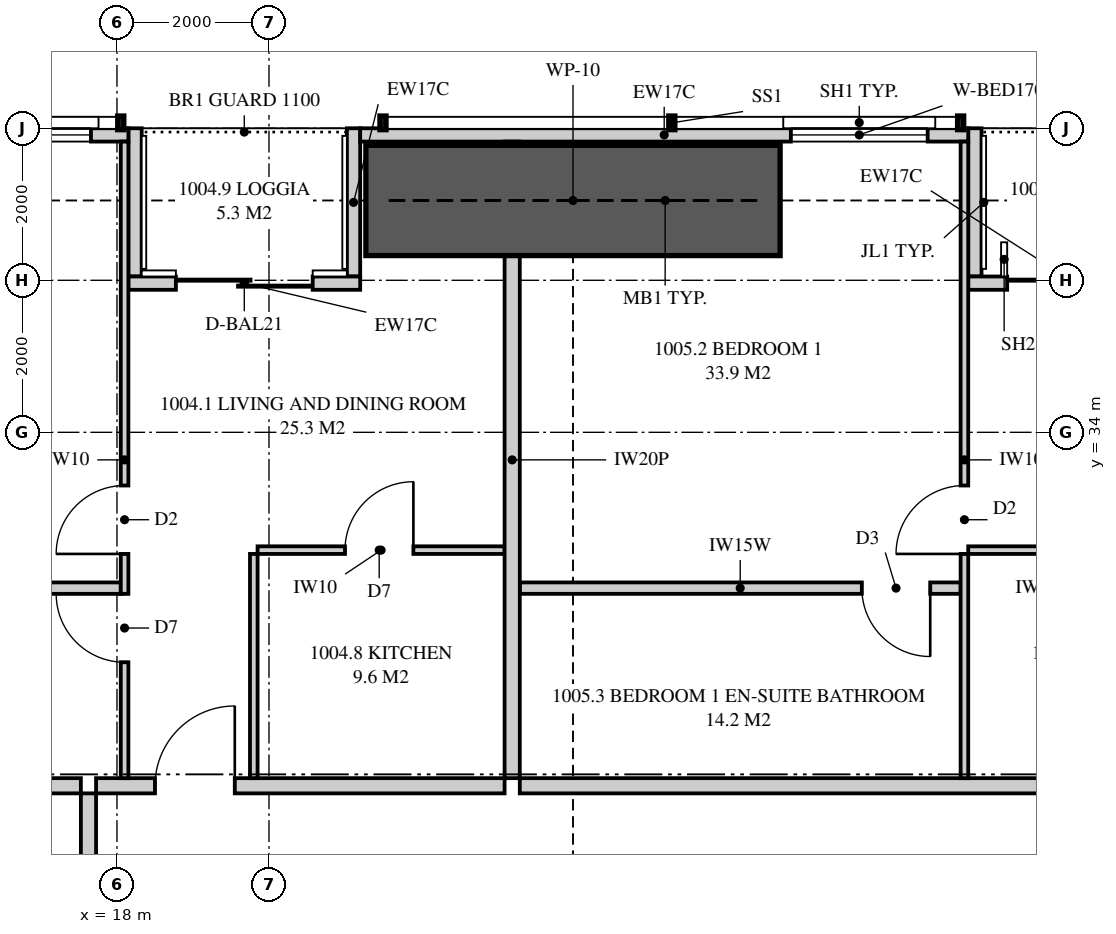
"""IFC4 building model, lengths in metres.
Left out: names, types, materials, properties, quantities, classifications, styles, units other than length and angle.
Written with IfcOpenShell. Run it as: python <this file> out.ifc"""

import sys

from ifc_helpers import new_model, si_unit, direction, frame, frame_2d, origin, place, context, subcontext, project, spatial, polyline, rectangle, outline, extrude, element, fill, save


model = new_model("IFC4")
c1 = context("Model", 3, precision=1e-05, world=origin(), true_north=direction((0.0, 1.0)))
c2 = subcontext(c1, "Body", "Model", "MODEL_VIEW")
j1 = project(units=[si_unit("LENGTHUNIT", "METRE"), si_unit("PLANEANGLEUNIT", "RADIAN")], contexts=[c1])
p1 = place(None, origin())
s1 = spatial("IfcSite", under=j1, at=p1, CompositionType="ELEMENT")
p2 = place(p1, origin())
s2 = spatial("IfcBuilding", under=s1, at=p2, CompositionType="ELEMENT")
p3 = place(p2, frame((0.0, 0.0, 41.1)))
s3 = spatial("IfcBuildingStorey", under=s2, at=p3, CompositionType="ELEMENT", Elevation=41.1)
p4 = place(p3, frame((29.2, 37.913, 0.0), z_axis=(0.0, 0.0, 1.0), x_axis=(-1.0, 0.0, 0.0)))
e1 = element("IfcWall", 1, at=p4, inside=s3, PredefinedType="SOLIDWALL", context=c2, shape_type="SweptSolid", body=[
    extrude(rectangle(XDim=8.0, YDim=0.175, at=frame_2d((4.0, 0.0))), origin(), (0.0, 0.0, 1.0), 2.15),
])
p5 = place(p4, frame((0.534, 0.0, 0.4)))
e2 = element("IfcOpeningElement", 2, at=p5, cuts=e1, PredefinedType="OPENING", context=c2, shape_type="SweptSolid", body=[
    extrude(rectangle(XDim=1.8, YDim=1.7, at=frame_2d((0.9, 0.85))), frame((0.0, 0.097, 0.0), z_axis=(0.0, -1.0, 0.0), x_axis=(1.0, 0.0, 0.0)), (0.0, 0.0, 1.0), 0.195),
])
p6 = place(p3, frame((18.15, 37.913, 0.0), z_axis=(0.0, 0.0, 1.0), x_axis=(-1.0, 0.0, 0.0)))
e3 = element("IfcWall", 3, at=p6, inside=s3, PredefinedType="SOLIDWALL", context=c2, shape_type="SweptSolid", body=[
    extrude(outline(polyline([(0.0, 0.0), (13.099, 0.0), (13.099, 3.11), (5.354, 3.11), (5.354, 2.15), (5.306, 2.15), (5.306, 3.11), (5.15, 3.11), (5.15, 2.15), (0.0, 2.15), (0.0, 0.0)])), frame((0.0, 0.087, 0.0), z_axis=(0.0, -1.0, 0.0), x_axis=(1.0, 0.0, 0.0)), (0.0, 0.0, 1.0), 0.175),
])
p7 = place(p6, frame((0.492, 0.0, 0.4)))
e4 = element("IfcOpeningElement", 4, at=p7, cuts=e3, PredefinedType="OPENING", context=c2, shape_type="SweptSolid", body=[
    extrude(rectangle(XDim=1.8, YDim=1.7, at=frame_2d((0.9, 0.85))), frame((0.0, 0.097, 0.0), z_axis=(0.0, -1.0, 0.0), x_axis=(1.0, 0.0, 0.0)), (0.0, 0.0, 1.0), 0.195),
])
p8 = place(p6, frame((7.98, 0.0, 0.4)))
e5 = element("IfcOpeningElement", 5, at=p8, cuts=e3, PredefinedType="OPENING", context=c2, shape_type="SweptSolid", body=[
    extrude(rectangle(XDim=1.8, YDim=1.7, at=frame_2d((0.9, 0.85))), frame((0.0, 0.097, 0.0), z_axis=(0.0, -1.0, 0.0), x_axis=(1.0, 0.0, 0.0)), (0.0, 0.0, 1.0), 0.195),
])
p9 = place(p3, frame((32.025, 35.962, 0.0), z_axis=(0.0, 0.0, 1.0), x_axis=(-1.0, 0.0, 0.0)))
e6 = element("IfcWall", 6, at=p9, inside=s3, PredefinedType="SOLIDWALL", context=c2, shape_type="SweptSolid", body=[
    extrude(rectangle(XDim=2.825, YDim=0.175, at=frame_2d((1.413, 0.0))), origin(), (0.0, 0.0, 1.0), 3.11),
])
p10 = place(p9, frame((0.512, 0.0, 0.0)))
e7 = element("IfcOpeningElement", 7, at=p10, cuts=e6, PredefinedType="OPENING", context=c2, shape_type="SweptSolid", body=[
    extrude(rectangle(XDim=1.8, YDim=2.1, at=frame_2d((0.9, 1.05))), frame((0.0, 0.097, 0.0), z_axis=(0.0, -1.0, 0.0), x_axis=(1.0, 0.0, 0.0)), (0.0, 0.0, 1.0), 0.195),
])
p11 = place(p3, frame((29.288, 38.0, 0.0), z_axis=(0.0, 0.0, 1.0), x_axis=(0.0, -1.0, 0.0)))
e8 = element("IfcWall", 8, at=p11, inside=s3, PredefinedType="SOLIDWALL", context=c2, shape_type="SweptSolid", body=[
    extrude(outline(polyline([(0.0, 0.0), (1.95, 0.0), (1.95, 3.11), (1.75, 3.11), (1.75, 2.15), (0.15, 2.15), (0.15, 3.11), (0.0, 3.11), (0.0, 0.0)])), frame((0.0, 0.087, 0.0), z_axis=(0.0, -1.0, 0.0), x_axis=(1.0, 0.0, 0.0)), (0.0, 0.0, 1.0), 0.175),
])
p12 = place(p3, frame((21.2, 35.962, 0.0), z_axis=(0.0, 0.0, 1.0), x_axis=(-1.0, 0.0, 0.0)))
e9 = element("IfcWall", 9, at=p12, inside=s3, PredefinedType="SOLIDWALL", context=c2, shape_type="SweptSolid", body=[
    extrude(rectangle(XDim=3.05, YDim=0.175, at=frame_2d((1.525, 0.0))), origin(), (0.0, 0.0, 1.0), 3.11),
])
p13 = place(p12, frame((0.625, 0.0, 0.0)))
e10 = element("IfcOpeningElement", 10, at=p13, cuts=e9, PredefinedType="OPENING", context=c2, shape_type="SweptSolid", body=[
    extrude(rectangle(XDim=1.8, YDim=2.1, at=frame_2d((0.9, 1.05))), frame((0.0, 0.097, 0.0), z_axis=(0.0, -1.0, 0.0), x_axis=(1.0, 0.0, 0.0)), (0.0, 0.0, 1.0), 0.195),
])
for number, where, z_axis, x_axis in (
    (11, (21.113, 38.0, 0.0), (0.0, 0.0, 1.0), (0.0, -1.0, 0.0)),
    (12, (18.238, 38.0, 0.0), (0.0, 0.0, 1.0), (0.0, -1.0, 0.0)),
):
    element("IfcWall", number, at=place(p3, frame(where, z_axis=z_axis, x_axis=x_axis)), inside=s3, PredefinedType="SOLIDWALL", context=c2, shape_type="SweptSolid", body=[
        extrude(outline(polyline([(0.0, 0.0), (1.95, 0.0), (1.95, 3.11), (1.75, 3.11), (1.75, 2.15), (0.15, 2.15), (0.15, 3.11), (0.0, 3.11), (0.0, 0.0)])), frame((0.0, 0.087, 0.0), z_axis=(0.0, -1.0, 0.0), x_axis=(1.0, 0.0, 0.0)), (0.0, 0.0, 1.0), 0.175),
    ])
p14 = place(p3, frame((23.2, 37.825, 0.0), z_axis=(0.0, 0.0, 1.0), x_axis=(0.0, -1.0, 0.0)))
e13 = element("IfcWall", 13, at=p14, inside=s3, PredefinedType="PARTITIONING", context=c2, shape_type="SweptSolid", body=[
    extrude(outline(polyline([(0.529, 2.15), (0.0, 2.15), (0.0, 0.0), (0.529, 0.0), (0.529, 0.953), (1.021, 0.953), (1.021, 0.0), (8.375, 0.0), (8.375, 3.11), (1.685, 3.11), (1.685, 2.15), (1.021, 2.15), (1.021, 1.197), (0.529, 1.197), (0.529, 2.15)])), frame((0.0, 0.1, 0.0), z_axis=(0.0, -1.0, 0.0), x_axis=(1.0, 0.0, 0.0)), (0.0, 0.0, 1.0), 0.2),
])
p15 = place(p3, frame((17.725, 29.35, 0.0), z_axis=(0.0, 0.0, 1.0), x_axis=(1.0, 0.0, 0.0)))
e14 = element("IfcWall", 14, at=p15, inside=s3, PredefinedType="PARTITIONING", context=c2, shape_type="SweptSolid", body=[
    extrude(rectangle(XDim=5.375, YDim=0.2, at=frame_2d((2.688, 0.0))), origin(), (0.0, 0.0, 1.0), 3.11),
])
p16 = place(p15, frame((0.775, 0.0, 0.0)))
e15 = element("IfcOpeningElement", 15, at=p16, cuts=e14, PredefinedType="OPENING", context=c2, shape_type="SweptSolid", body=[
    extrude(rectangle(XDim=1.05, YDim=2.2, at=frame_2d((0.525, 1.1))), frame((0.0, 0.11, 0.0), z_axis=(0.0, -1.0, 0.0), x_axis=(1.0, 0.0, 0.0)), (0.0, 0.0, 1.0), 0.22),
])
p17 = place(p3, frame((18.1, 37.825, 0.0), z_axis=(0.0, 0.0, 1.0), x_axis=(0.0, -1.0, 0.0)))
e16 = element("IfcWall", 16, at=p17, inside=s3, PredefinedType="PARTITIONING", context=c2, shape_type="SweptSolid", body=[
    extrude(outline(polyline([(0.0, 0.0), (8.375, 0.0), (8.375, 3.11), (1.635, 3.11), (1.635, 2.15), (0.0, 2.15), (0.0, 3.11), (0.0, 0.0)])), frame((0.0, 0.05, 0.0), z_axis=(0.0, -1.0, 0.0), x_axis=(1.0, 0.0, 0.0)), (0.0, 0.0, 1.0), 0.1),
])
p18 = place(p17, frame((4.525, 0.0, 0.0)))
e17 = element("IfcOpeningElement", 17, at=p18, cuts=e16, PredefinedType="OPENING", context=c2, shape_type="SweptSolid", body=[
    extrude(rectangle(XDim=0.9, YDim=2.1, at=frame_2d((0.45, 1.05))), frame((0.0, 0.06, 0.0), z_axis=(0.0, -1.0, 0.0), x_axis=(1.0, 0.0, 0.0)), (0.0, 0.0, 1.0), 0.12),
])
p19 = place(p17, frame((5.95, 0.0, 0.0)))
e18 = element("IfcOpeningElement", 18, at=p19, cuts=e16, PredefinedType="OPENING", context=c2, shape_type="SweptSolid", body=[
    extrude(rectangle(XDim=0.9, YDim=2.1, at=frame_2d((0.45, 1.05))), frame((0.0, 0.06, 0.0), z_axis=(0.0, -1.0, 0.0), x_axis=(1.0, 0.0, 0.0)), (0.0, 0.0, 1.0), 0.12),
])
p20 = place(p3, frame((13.85, 31.95, 0.0), z_axis=(0.0, 0.0, 1.0), x_axis=(1.0, 0.0, 0.0)))
e19 = element("IfcWall", 19, at=p20, inside=s3, PredefinedType="PLUMBINGWALL", context=c2, shape_type="SweptSolid", body=[
    extrude(rectangle(XDim=4.2, YDim=0.15, at=frame_2d((2.1, 0.0))), origin(), (0.0, 0.0, 1.0), 3.11),
])
p21 = place(p3, frame((19.85, 32.45, 0.0), z_axis=(0.0, 0.0, 1.0), x_axis=(1.0, 0.0, 0.0)))
e20 = element("IfcWall", 20, at=p21, inside=s3, PredefinedType="PARTITIONING", context=c2, shape_type="SweptSolid", body=[
    extrude(rectangle(XDim=3.25, YDim=0.1, at=frame_2d((1.625, 0.0))), origin(), (0.0, 0.0, 1.0), 3.11),
])
p22 = place(p21, frame((1.15, 0.0, 0.0)))
e21 = element("IfcOpeningElement", 21, at=p22, cuts=e20, PredefinedType="OPENING", context=c2, shape_type="SweptSolid", body=[
    extrude(rectangle(XDim=0.9, YDim=2.1, at=frame_2d((0.45, 1.05))), frame((0.0, 0.06, 0.0), z_axis=(0.0, -1.0, 0.0), x_axis=(1.0, 0.0, 0.0)), (0.0, 0.0, 1.0), 0.12),
])
p23 = place(p3, frame((19.8, 32.4, 0.0), z_axis=(0.0, 0.0, 1.0), x_axis=(0.0, -1.0, 0.0)))
e22 = element("IfcWall", 22, at=p23, inside=s3, PredefinedType="PARTITIONING", context=c2, shape_type="SweptSolid", body=[
    extrude(rectangle(XDim=2.95, YDim=0.1, at=frame_2d((1.475, 0.0))), origin(), (0.0, 0.0, 1.0), 3.11),
])
p24 = place(p3, frame((23.3, 29.35, 0.0), z_axis=(0.0, 0.0, 1.0), x_axis=(1.0, 0.0, 0.0)))
e23 = element("IfcWall", 23, at=p24, inside=s3, PredefinedType="PARTITIONING", context=c2, shape_type="SweptSolid", body=[
    extrude(outline(polyline([(0.0, 0.0), (9.9, 0.0), (9.9, 3.11), (1.037, 3.11), (1.037, 2.541), (0.363, 2.541), (0.363, 3.11), (0.0, 3.11), (0.0, 0.0)])), frame((0.0, 0.1, 0.0), z_axis=(0.0, -1.0, 0.0), x_axis=(1.0, 0.0, 0.0)), (0.0, 0.0, 1.0), 0.2),
])
p25 = place(p3, frame((29.15, 37.825, 0.0), z_axis=(0.0, 0.0, 1.0), x_axis=(0.0, -1.0, 0.0)))
e24 = element("IfcWall", 24, at=p25, inside=s3, PredefinedType="PARTITIONING", context=c2, shape_type="SweptSolid", body=[
    extrude(outline(polyline([(0.0, 0.0), (8.375, 0.0), (8.375, 3.11), (1.635, 3.11), (1.635, 2.15), (0.0, 2.15), (0.0, 3.11), (0.0, 0.0)])), frame((0.0, 0.05, 0.0), z_axis=(0.0, -1.0, 0.0), x_axis=(1.0, 0.0, 0.0)), (0.0, 0.0, 1.0), 0.1),
])
p26 = place(p25, frame((4.525, 0.0, 0.0)))
e25 = element("IfcOpeningElement", 25, at=p26, cuts=e24, PredefinedType="OPENING", context=c2, shape_type="SweptSolid", body=[
    extrude(rectangle(XDim=0.9, YDim=2.1, at=frame_2d((0.45, 1.05))), frame((0.0, 0.06, 0.0), z_axis=(0.0, -1.0, 0.0), x_axis=(1.0, 0.0, 0.0)), (0.0, 0.0, 1.0), 0.12),
])
p27 = place(p3, frame((23.3, 31.95, 0.0), z_axis=(0.0, 0.0, 1.0), x_axis=(1.0, 0.0, 0.0)))
e26 = element("IfcWall", 26, at=p27, inside=s3, PredefinedType="PLUMBINGWALL", context=c2, shape_type="SweptSolid", body=[
    extrude(outline(polyline([(0.0, 0.0), (5.8, 0.0), (5.8, 3.11), (1.012, 3.11), (1.012, 2.541), (0.388, 2.541), (0.388, 3.11), (0.0, 3.11), (0.0, 0.0)])), frame((0.0, 0.075, 0.0), z_axis=(0.0, -1.0, 0.0), x_axis=(1.0, 0.0, 0.0)), (0.0, 0.0, 1.0), 0.15),
])
p28 = place(p27, frame((4.5, 0.0, 0.0)))
e27 = element("IfcOpeningElement", 27, at=p28, cuts=e26, PredefinedType="OPENING", context=c2, shape_type="SweptSolid", body=[
    extrude(rectangle(XDim=0.9, YDim=2.1, at=frame_2d((0.45, 1.05))), frame((0.0, 0.085, 0.0), z_axis=(0.0, -1.0, 0.0), x_axis=(1.0, 0.0, 0.0)), (0.0, 0.0, 1.0), 0.17),
])
p29 = place(p3, frame((29.2, 32.45, 0.0), z_axis=(0.0, 0.0, 1.0), x_axis=(1.0, 0.0, 0.0)))
e28 = element("IfcWall", 28, at=p29, inside=s3, PredefinedType="PARTITIONING", context=c2, shape_type="SweptSolid", body=[
    extrude(rectangle(XDim=3.55, YDim=0.1, at=frame_2d((1.775, 0.0))), origin(), (0.0, 0.0, 1.0), 3.11),
])
p30 = place(p29, frame((1.35, 0.0, 0.0)))
e29 = element("IfcOpeningElement", 29, at=p30, cuts=e28, PredefinedType="OPENING", context=c2, shape_type="SweptSolid", body=[
    extrude(rectangle(XDim=0.9, YDim=2.1, at=frame_2d((0.45, 1.05))), frame((0.0, 0.06, 0.0), z_axis=(0.0, -1.0, 0.0), x_axis=(1.0, 0.0, 0.0)), (0.0, 0.0, 1.0), 0.12),
])
p31 = place(p3, frame((2.0, 29.35, 0.0), z_axis=(0.0, 0.0, 1.0), x_axis=(1.0, 0.0, 0.0)))
e30 = element("IfcWall", 30, at=p31, inside=s3, PredefinedType="PARTITIONING", context=c2, shape_type="SweptSolid", body=[
    extrude(outline(polyline([(0.0, 0.0), (15.525, 0.0), (15.525, 3.11), (11.337, 3.11), (11.337, 2.541), (10.663, 2.541), (10.663, 3.11), (9.51, 3.11), (9.51, 2.51), (6.89, 2.51), (6.89, 3.11), (2.969, 3.11), (2.969, 2.541), (2.577, 2.541), (2.577, 2.15), (0.733, 2.15), (0.733, 3.11), (0.0, 3.11), (0.0, 0.0)])), frame((0.0, 0.1, 0.0), z_axis=(0.0, -1.0, 0.0), x_axis=(1.0, 0.0, 0.0)), (0.0, 0.0, 1.0), 0.2),
])
p32 = place(p3, frame((17.625, 24.1, 0.0), z_axis=(0.0, 0.0, 1.0), x_axis=(0.0, 1.0, 0.0)))
e31 = element("IfcWall", 31, at=p32, inside=s3, PredefinedType="PARTITIONING", context=c2, shape_type="SweptSolid", body=[
    extrude(outline(polyline([(0.0, 0.0), (5.15, 0.0), (5.15, 3.11), (1.237, 3.11), (1.237, 2.541), (0.562, 2.541), (0.562, 3.11), (0.0, 3.11), (0.0, 0.0)])), frame((0.0, 0.1, 0.0), z_axis=(0.0, -1.0, 0.0), x_axis=(1.0, 0.0, 0.0)), (0.0, 0.0, 1.0), 0.2),
])
p33 = place(p32, frame((1.675, 0.0, 0.0)))
e32 = element("IfcOpeningElement", 32, at=p33, cuts=e31, PredefinedType="OPENING", context=c2, shape_type="SweptSolid", body=[
    extrude(rectangle(XDim=1.8, YDim=2.1, at=frame_2d((0.9, 1.05))), frame((0.0, 0.11, 0.0), z_axis=(0.0, -1.0, 0.0), x_axis=(1.0, 0.0, 0.0)), (0.0, 0.0, 1.0), 0.22),
])
p34 = place(p3, frame((21.275, 37.05, 0.0), z_axis=(0.0, 0.0, 1.0), x_axis=(1.0, 0.0, 0.0)))
e33 = element("IfcWall", 33, at=p34, inside=s3, PredefinedType="SHEAR", context=c2, shape_type="SweptSolid", body=[
    extrude(rectangle(XDim=5.45, YDim=1.45, at=frame_2d((2.725, 0.0))), origin(), (0.0, 0.0, 1.0), 3.35),
])
p35 = place(p10, origin())
e34 = element("IfcDoor", 34, at=p35, inside=s3, OperationType="SLIDING_TO_LEFT", PredefinedType="DOOR", context=c2, shape_type="SweptSolid", body=[
    extrude(rectangle(XDim=1.8, YDim=2.1, at=frame_2d((0.9, 1.05))), frame((0.0, 0.025, 0.0), z_axis=(0.0, -1.0, 0.0), x_axis=(1.0, 0.0, 0.0)), (0.0, 0.0, 1.0), 0.05),
])
fill(e7, e34)
p36 = place(p5, origin())
e35 = element("IfcWindow", 35, at=p36, inside=s3, PartitioningType="SINGLE_PANEL", PredefinedType="WINDOW", context=c2, shape_type="SweptSolid", body=[
    extrude(rectangle(XDim=1.8, YDim=1.7, at=frame_2d((0.9, 0.85))), frame((0.0, 0.03, 0.0), z_axis=(0.0, -1.0, 0.0), x_axis=(1.0, 0.0, 0.0)), (0.0, 0.0, 1.0), 0.06),
])
fill(e2, e35)
p37 = place(p13, origin())
e36 = element("IfcDoor", 36, at=p37, inside=s3, OperationType="SLIDING_TO_LEFT", PredefinedType="DOOR", context=c2, shape_type="SweptSolid", body=[
    extrude(rectangle(XDim=1.8, YDim=2.1, at=frame_2d((0.9, 1.05))), frame((0.0, 0.025, 0.0), z_axis=(0.0, -1.0, 0.0), x_axis=(1.0, 0.0, 0.0)), (0.0, 0.0, 1.0), 0.05),
])
fill(e10, e36)
p38 = place(p7, origin())
e37 = element("IfcWindow", 37, at=p38, inside=s3, PartitioningType="SINGLE_PANEL", PredefinedType="WINDOW", context=c2, shape_type="SweptSolid", body=[
    extrude(rectangle(XDim=1.8, YDim=1.7, at=frame_2d((0.9, 0.85))), frame((0.0, 0.03, 0.0), z_axis=(0.0, -1.0, 0.0), x_axis=(1.0, 0.0, 0.0)), (0.0, 0.0, 1.0), 0.06),
])
fill(e4, e37)
p39 = place(p16, origin())
e38 = element("IfcDoor", 38, at=p39, inside=s3, OperationType="SINGLE_SWING_RIGHT", PredefinedType="DOOR", context=c2, shape_type="SweptSolid", body=[
    extrude(rectangle(XDim=1.05, YDim=2.2, at=frame_2d((0.525, 1.1))), frame((0.0, 0.025, 0.0), z_axis=(0.0, -1.0, 0.0), x_axis=(1.0, 0.0, 0.0)), (0.0, 0.0, 1.0), 0.05),
])
fill(e15, e38)
p40 = place(p18, frame((0.9, 0.0, 0.0), z_axis=(0.0, 0.0, 1.0), x_axis=(-1.0, 0.0, 0.0)))
e39 = element("IfcDoor", 39, at=p40, inside=s3, OperationType="SINGLE_SWING_LEFT", PredefinedType="DOOR", context=c2, shape_type="SweptSolid", body=[
    extrude(rectangle(XDim=0.9, YDim=2.1, at=frame_2d((0.45, 1.05))), frame((0.0, 0.025, 0.0), z_axis=(0.0, -1.0, 0.0), x_axis=(1.0, 0.0, 0.0)), (0.0, 0.0, 1.0), 0.05),
])
fill(e17, e39)
p41 = place(p19, frame((0.9, 0.0, 0.0), z_axis=(0.0, 0.0, 1.0), x_axis=(-1.0, 0.0, 0.0)))
e40 = element("IfcDoor", 40, at=p41, inside=s3, OperationType="SINGLE_SWING_RIGHT", PredefinedType="DOOR", context=c2, shape_type="SweptSolid", body=[
    extrude(rectangle(XDim=0.9, YDim=2.1, at=frame_2d((0.45, 1.05))), frame((0.0, 0.025, 0.0), z_axis=(0.0, -1.0, 0.0), x_axis=(1.0, 0.0, 0.0)), (0.0, 0.0, 1.0), 0.05),
])
fill(e18, e40)
p42 = place(p22, origin())
e41 = element("IfcDoor", 41, at=p42, inside=s3, OperationType="SINGLE_SWING_RIGHT", PredefinedType="DOOR", context=c2, shape_type="SweptSolid", body=[
    extrude(rectangle(XDim=0.9, YDim=2.1, at=frame_2d((0.45, 1.05))), frame((0.0, 0.025, 0.0), z_axis=(0.0, -1.0, 0.0), x_axis=(1.0, 0.0, 0.0)), (0.0, 0.0, 1.0), 0.05),
])
fill(e21, e41)
p43 = place(p26, frame((0.9, 0.0, 0.0), z_axis=(0.0, 0.0, 1.0), x_axis=(-1.0, 0.0, 0.0)))
e42 = element("IfcDoor", 42, at=p43, inside=s3, OperationType="SINGLE_SWING_LEFT", PredefinedType="DOOR", context=c2, shape_type="SweptSolid", body=[
    extrude(rectangle(XDim=0.9, YDim=2.1, at=frame_2d((0.45, 1.05))), frame((0.0, 0.025, 0.0), z_axis=(0.0, -1.0, 0.0), x_axis=(1.0, 0.0, 0.0)), (0.0, 0.0, 1.0), 0.05),
])
fill(e25, e42)
p44 = place(p28, frame((0.9, 0.0, 0.0), z_axis=(0.0, 0.0, 1.0), x_axis=(-1.0, 0.0, 0.0)))
e43 = element("IfcDoor", 43, at=p44, inside=s3, OperationType="SINGLE_SWING_LEFT", PredefinedType="DOOR", context=c2, shape_type="SweptSolid", body=[
    extrude(rectangle(XDim=0.9, YDim=2.1, at=frame_2d((0.45, 1.05))), frame((0.0, 0.025, 0.0), z_axis=(0.0, -1.0, 0.0), x_axis=(1.0, 0.0, 0.0)), (0.0, 0.0, 1.0), 0.05),
])
fill(e27, e43)
save(model, sys.argv[1])
